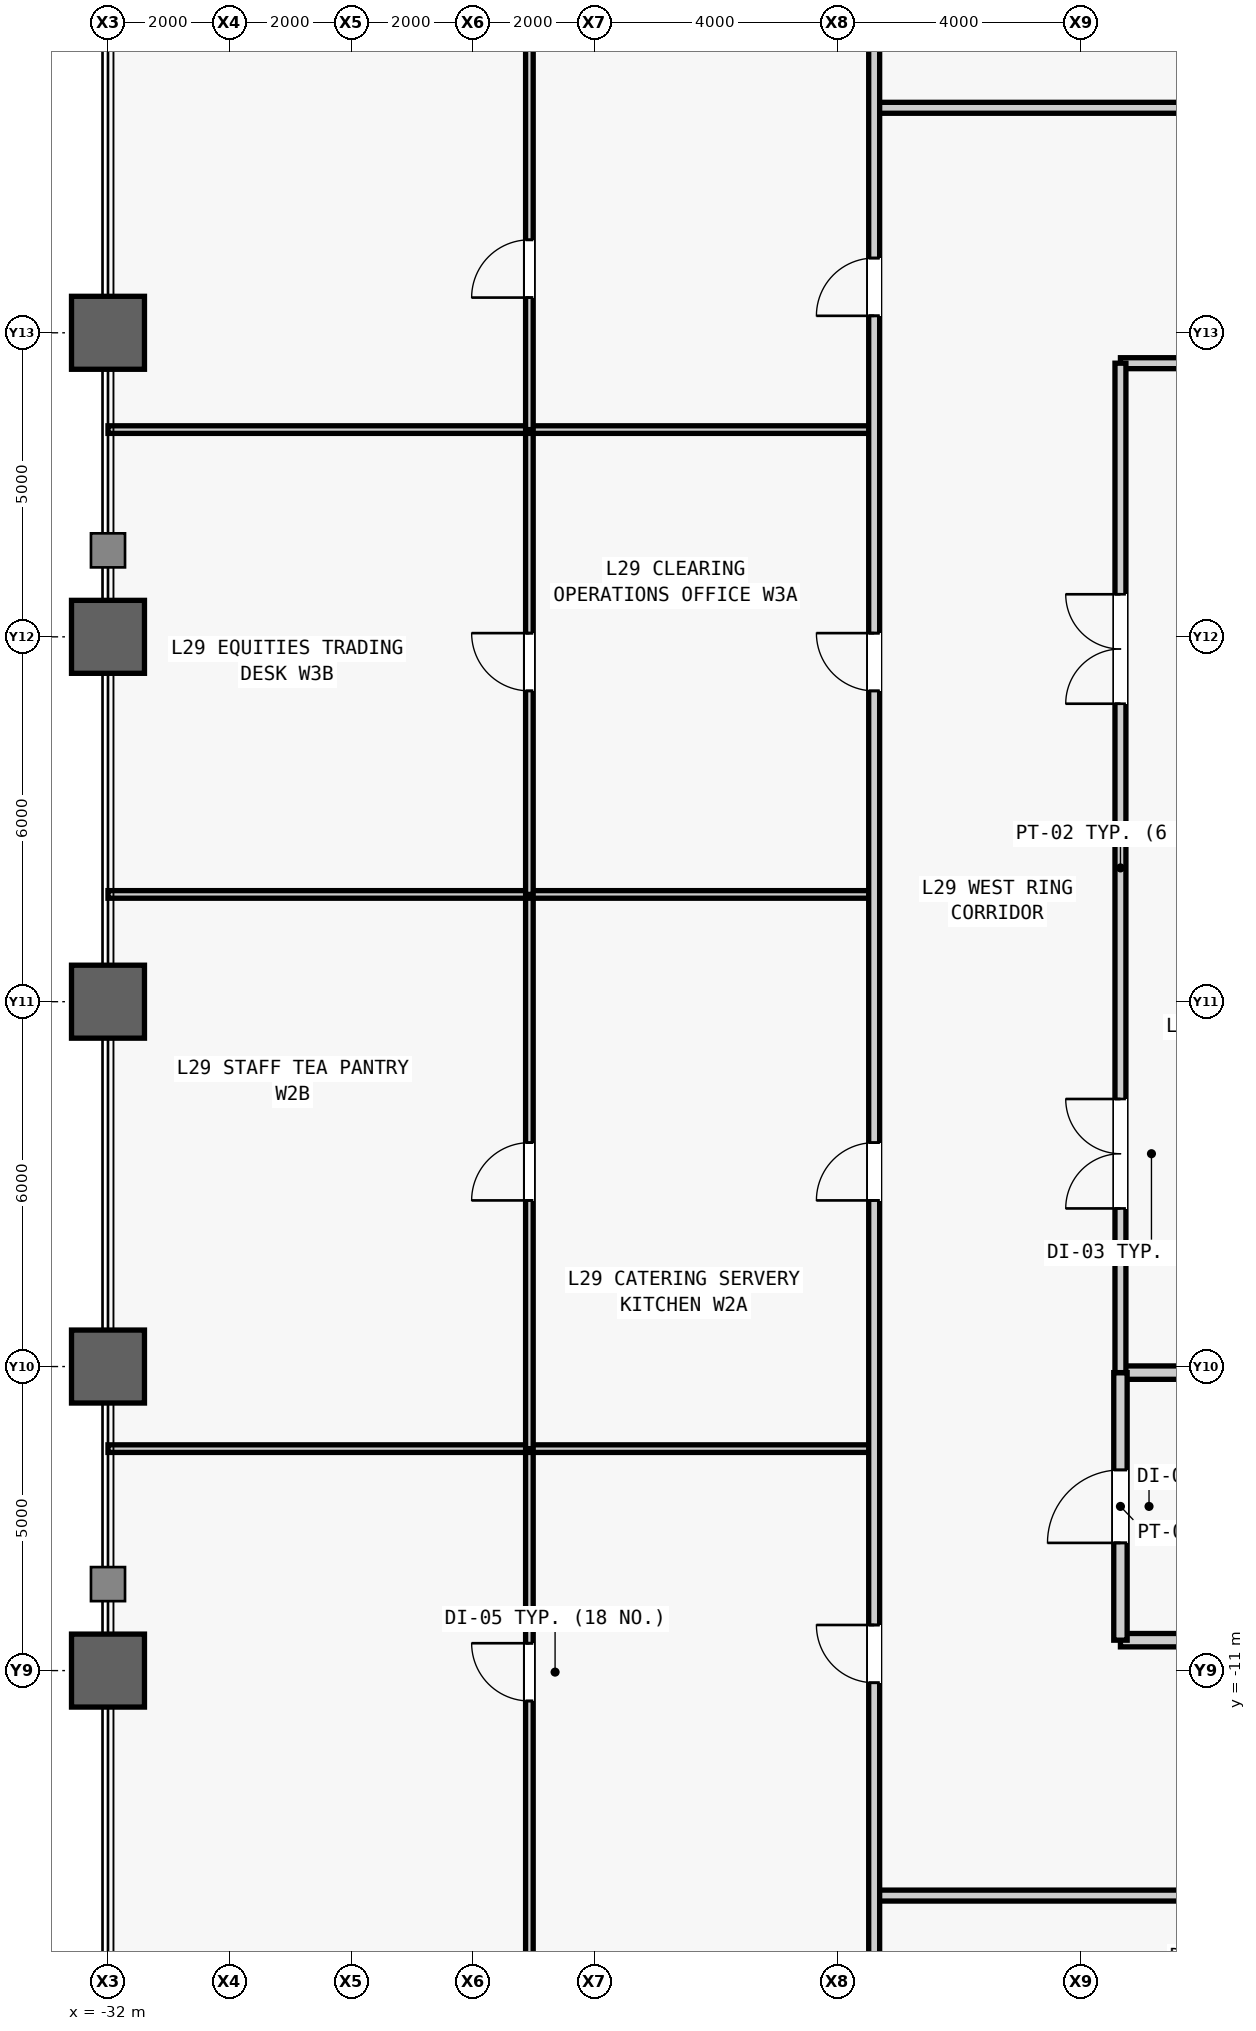
"""IFC4 building model, lengths in metres.
Left out: names, types, materials, properties, quantities, classifications, styles, units other than length and angle.
Written with IfcOpenShell. Run it as: python <this file> out.ifc"""

import sys

from ifc_helpers import new_model, si_unit, direction, frame, frame_2d, origin, origin_2d, place, context, subcontext, project, spatial, rectangle, hollow_rectangle, extrude, source, transform, mapped, element, fill, save


model = new_model("IFC4")
c1 = context("Model", 3, precision=1e-05, world=origin(), true_north=direction((0.0, 1.0)))
c2 = subcontext(c1, "Body", "Model", "MODEL_VIEW")
j1 = project(units=[si_unit("LENGTHUNIT", "METRE"), si_unit("PLANEANGLEUNIT", "RADIAN")], contexts=[c1])
p1 = place(None, origin())
s1 = spatial("IfcSite", under=j1, at=p1, CompositionType="ELEMENT")
p2 = place(p1, origin())
s2 = spatial("IfcBuilding", under=s1, at=p2, CompositionType="ELEMENT")
p3 = place(p2, frame((0.0, 0.0, 128.3)))
s3 = spatial("IfcBuildingStorey", under=s2, at=p3, CompositionType="ELEMENT", Elevation=128.3)
m1 = source(origin(), c2, "Body", "SweptSolid", [
    extrude(hollow_rectangle(XDim=1.2, YDim=1.2, WallThickness=0.07, at=origin_2d()), origin(), (0.0, 0.0, 1.0), 4.1),
])
for number, where, z_axis, x_axis in (
    (1, (-32.0, -11.0, 0.0), (0.0, 0.0, 1.0), (1.0, 0.0, 0.0)),
    (2, (-32.0, -6.0, 0.0), (0.0, 0.0, 1.0), (1.0, 0.0, 0.0)),
    (3, (-32.0, 0.0, 0.0), (0.0, 0.0, 1.0), (1.0, 0.0, 0.0)),
    (4, (-32.0, 6.0, 0.0), (0.0, 0.0, 1.0), (1.0, 0.0, 0.0)),
    (5, (-32.0, 11.0, 0.0), (0.0, 0.0, 1.0), (1.0, 0.0, 0.0)),
):
    element("IfcColumn", number, at=place(p3, frame(where, z_axis=z_axis, x_axis=x_axis)), inside=s3, PredefinedType="COLUMN", context=c2, shape_type="MappedRepresentation", body=[
        mapped(m1, transform((0.0, 0.0, 0.0), scale=1.0)),
    ])
m2 = source(origin(), c2, "Body", "SweptSolid", [
    extrude(rectangle(XDim=4.05, YDim=0.22, at=frame_2d((2.025, 0.0))), origin(), (0.0, 0.0, 1.0), 3.84),
])
p4 = place(p3, frame((-15.35, -10.5, 0.0), z_axis=(0.0, 0.0, 1.0), x_axis=(1.0, 0.0, 0.0)))
e6 = element("IfcWall", 6, at=p4, inside=s3, PredefinedType="PARTITIONING", context=c2, shape_type="MappedRepresentation", body=[
    mapped(m2, transform((0.0, 0.0, 0.0), scale=1.0)),
])
m3 = source(origin(), c2, "Body", "SweptSolid", [
    extrude(rectangle(XDim=4.05, YDim=0.22, at=frame_2d((2.025, 0.0))), origin(), (0.0, 0.0, 1.0), 3.067),
])
p5 = place(p3, frame((-15.35, -6.1, 0.0), z_axis=(0.0, 0.0, 1.0), x_axis=(1.0, 0.0, 0.0)))
e7 = element("IfcWall", 7, at=p5, inside=s3, PredefinedType="PARTITIONING", context=c2, shape_type="MappedRepresentation", body=[
    mapped(m3, transform((0.0, 0.0, 0.0), scale=1.0)),
])
m4 = source(origin(), c2, "Body", "SweptSolid", [
    extrude(rectangle(XDim=4.4, YDim=0.22, at=frame_2d((2.2, 0.0))), origin(), (0.0, 0.0, 1.0), 3.84),
])
p6 = place(p3, frame((-15.35, -10.5, 0.0), z_axis=(0.0, 0.0, 1.0), x_axis=(0.0, 1.0, 0.0)))
e8 = element("IfcWall", 8, at=p6, inside=s3, PredefinedType="PARTITIONING", context=c2, shape_type="MappedRepresentation", body=[
    mapped(m4, transform((0.0, 0.0, 0.0), scale=1.0)),
])
m5 = source(origin(), c2, "Body", "SweptSolid", [
    extrude(rectangle(XDim=1.2, YDim=2.2, at=frame_2d((0.6, 1.1))), frame((0.0, 0.12, 0.0), z_axis=(0.0, -1.0, 0.0), x_axis=(1.0, 0.0, 0.0)), (0.0, 0.0, 1.0), 0.24),
])
p7 = place(p6, frame((1.6, 0.0, 0.0)))
e9 = element("IfcOpeningElement", 9, at=p7, cuts=e8, PredefinedType="OPENING", context=c2, shape_type="MappedRepresentation", body=[
    mapped(m5, transform((0.0, 0.0, 0.0), scale=1.0)),
])
m6 = source(origin(), c2, "Body", "SweptSolid", [
    extrude(rectangle(XDim=4.05, YDim=0.18, at=frame_2d((2.025, 0.0))), origin(), (0.0, 0.0, 1.0), 3.84),
])
p8 = place(p3, frame((-15.35, 10.5, 0.0), z_axis=(0.0, 0.0, 1.0), x_axis=(1.0, 0.0, 0.0)))
e10 = element("IfcWall", 10, at=p8, inside=s3, PredefinedType="PARTITIONING", context=c2, shape_type="MappedRepresentation", body=[
    mapped(m6, transform((0.0, 0.0, 0.0), scale=1.0)),
])
m7 = source(origin(), c2, "Body", "SweptSolid", [
    extrude(rectangle(XDim=16.6, YDim=0.18, at=frame_2d((8.3, 0.0))), origin(), (0.0, 0.0, 1.0), 3.84),
])
p9 = place(p3, frame((-15.35, -6.1, 0.0), z_axis=(0.0, 0.0, 1.0), x_axis=(0.0, 1.0, 0.0)))
e11 = element("IfcWall", 11, at=p9, inside=s3, PredefinedType="PARTITIONING", context=c2, shape_type="MappedRepresentation", body=[
    mapped(m7, transform((0.0, 0.0, 0.0), scale=1.0)),
])
m8 = source(origin(), c2, "Body", "SweptSolid", [
    extrude(rectangle(XDim=1.8, YDim=2.25, at=frame_2d((0.9, 1.125))), frame((0.0, 0.1, 0.0), z_axis=(0.0, -1.0, 0.0), x_axis=(1.0, 0.0, 0.0)), (0.0, 0.0, 1.0), 0.2),
])
p10 = place(p9, frame((2.7, 0.0, 0.0)))
e12 = element("IfcOpeningElement", 12, at=p10, cuts=e11, PredefinedType="OPENING", context=c2, shape_type="MappedRepresentation", body=[
    mapped(m8, transform((0.0, 0.0, 0.0), scale=1.0)),
])
p11 = place(p9, frame((11.0, 0.0, 0.0)))
e13 = element("IfcOpeningElement", 13, at=p11, cuts=e11, PredefinedType="OPENING", context=c2, shape_type="MappedRepresentation", body=[
    mapped(m8, transform((0.0, 0.0, 0.0), scale=1.0)),
])
m9 = source(origin(), c2, "Body", "SweptSolid", [
    extrude(rectangle(XDim=37.1, YDim=0.18, at=frame_2d((18.55, 0.0))), origin(), (0.0, 0.0, 1.0), 3.84),
])
p12 = place(p3, frame((-19.4, -14.7, 0.0), z_axis=(0.0, 0.0, 1.0), x_axis=(1.0, 0.0, 0.0)))
e14 = element("IfcWall", 14, at=p12, inside=s3, PredefinedType="PARTITIONING", context=c2, shape_type="MappedRepresentation", body=[
    mapped(m9, transform((0.0, 0.0, 0.0), scale=1.0)),
])
m10 = source(origin(), c2, "Body", "SweptSolid", [
    extrude(rectangle(XDim=1.05, YDim=2.2, at=frame_2d((0.525, 1.1))), frame((0.0, 0.1, 0.0), z_axis=(0.0, -1.0, 0.0), x_axis=(1.0, 0.0, 0.0)), (0.0, 0.0, 1.0), 0.2),
])
p13 = place(p12, frame((6.056, 0.0, 0.0)))
e15 = element("IfcOpeningElement", 15, at=p13, cuts=e14, PredefinedType="OPENING", context=c2, shape_type="MappedRepresentation", body=[
    mapped(m10, transform((0.0, 0.0, 0.0), scale=1.0)),
])
p14 = place(p12, frame((12.46, 0.0, 0.0)))
e16 = element("IfcOpeningElement", 16, at=p14, cuts=e14, PredefinedType="OPENING", context=c2, shape_type="MappedRepresentation", body=[
    mapped(m10, transform((0.0, 0.0, 0.0), scale=1.0)),
])
p15 = place(p12, frame((22.477, 0.0, 0.0)))
e17 = element("IfcOpeningElement", 17, at=p15, cuts=e14, PredefinedType="OPENING", context=c2, shape_type="MappedRepresentation", body=[
    mapped(m10, transform((0.0, 0.0, 0.0), scale=1.0)),
])
p16 = place(p12, frame((30.473, 0.0, 0.0)))
e18 = element("IfcOpeningElement", 18, at=p16, cuts=e14, PredefinedType="OPENING", context=c2, shape_type="MappedRepresentation", body=[
    mapped(m10, transform((0.0, 0.0, 0.0), scale=1.0)),
])
p17 = place(p3, frame((-19.4, 14.7, 0.0), z_axis=(0.0, 0.0, 1.0), x_axis=(1.0, 0.0, 0.0)))
e19 = element("IfcWall", 19, at=p17, inside=s3, PredefinedType="PARTITIONING", context=c2, shape_type="MappedRepresentation", body=[
    mapped(m9, transform((0.0, 0.0, 0.0), scale=1.0)),
])
p18 = place(p17, frame((10.323, 0.0, 0.0)))
e20 = element("IfcOpeningElement", 20, at=p18, cuts=e19, PredefinedType="OPENING", context=c2, shape_type="MappedRepresentation", body=[
    mapped(m10, transform((0.0, 0.0, 0.0), scale=1.0)),
])
p19 = place(p17, frame((24.722, 0.0, 0.0)))
e21 = element("IfcOpeningElement", 21, at=p19, cuts=e19, PredefinedType="OPENING", context=c2, shape_type="MappedRepresentation", body=[
    mapped(m10, transform((0.0, 0.0, 0.0), scale=1.0)),
])
m11 = source(origin(), c2, "Body", "SweptSolid", [
    extrude(rectangle(XDim=20.65, YDim=0.125, at=frame_2d((10.325, 0.0))), origin(), (0.0, 0.0, 1.0), 3.84),
])
p20 = place(p3, frame((-25.07, -28.0, 0.0), z_axis=(0.0, 0.0, 1.0), x_axis=(0.0, 1.0, 0.0)))
e22 = element("IfcWall", 22, at=p20, inside=s3, PredefinedType="PARTITIONING", context=c2, shape_type="MappedRepresentation", body=[
    mapped(m11, transform((0.0, 0.0, 0.0), scale=1.0)),
])
m12 = source(origin(), c2, "Body", "SweptSolid", [
    extrude(rectangle(XDim=0.95, YDim=2.15, at=frame_2d((0.475, 1.075))), frame((0.0, 0.073, 0.0), z_axis=(0.0, -1.0, 0.0), x_axis=(1.0, 0.0, 0.0)), (0.0, 0.0, 1.0), 0.145),
])
p21 = place(p20, frame((16.5, 0.0, 0.0)))
e23 = element("IfcOpeningElement", 23, at=p21, cuts=e22, PredefinedType="OPENING", context=c2, shape_type="MappedRepresentation", body=[
    mapped(m12, transform((0.0, 0.0, 0.0), scale=1.0)),
])
m13 = source(origin(), c2, "Body", "SweptSolid", [
    extrude(rectangle(XDim=12.6, YDim=0.125, at=frame_2d((6.3, 0.0))), origin(), (0.0, 0.0, 1.0), 3.84),
])
p22 = place(p3, frame((-32.0, -7.35, 0.0), z_axis=(0.0, 0.0, 1.0), x_axis=(1.0, 0.0, 0.0)))
e24 = element("IfcWall", 24, at=p22, inside=s3, PredefinedType="PARTITIONING", context=c2, shape_type="MappedRepresentation", body=[
    mapped(m13, transform((0.0, 0.0, 0.0), scale=1.0)),
])
m14 = source(origin(), c2, "Body", "SweptSolid", [
    extrude(rectangle(XDim=9.114, YDim=0.125, at=frame_2d((4.557, 0.0))), origin(), (0.0, 0.0, 1.0), 3.84),
])
p23 = place(p3, frame((-25.07, -7.35, 0.0), z_axis=(0.0, 0.0, 1.0), x_axis=(0.0, 1.0, 0.0)))
e25 = element("IfcWall", 25, at=p23, inside=s3, PredefinedType="PARTITIONING", context=c2, shape_type="MappedRepresentation", body=[
    mapped(m14, transform((0.0, 0.0, 0.0), scale=1.0)),
])
p24 = place(p23, frame((4.082, 0.0, 0.0)))
e26 = element("IfcOpeningElement", 26, at=p24, cuts=e25, PredefinedType="OPENING", context=c2, shape_type="MappedRepresentation", body=[
    mapped(m12, transform((0.0, 0.0, 0.0), scale=1.0)),
])
p25 = place(p3, frame((-32.0, 1.764, 0.0), z_axis=(0.0, 0.0, 1.0), x_axis=(1.0, 0.0, 0.0)))
e27 = element("IfcWall", 27, at=p25, inside=s3, PredefinedType="PARTITIONING", context=c2, shape_type="MappedRepresentation", body=[
    mapped(m13, transform((0.0, 0.0, 0.0), scale=1.0)),
])
m15 = source(origin(), c2, "Body", "SweptSolid", [
    extrude(rectangle(XDim=7.644, YDim=0.125, at=frame_2d((3.822, 0.0))), origin(), (0.0, 0.0, 1.0), 3.84),
])
p26 = place(p3, frame((-25.07, 1.764, 0.0), z_axis=(0.0, 0.0, 1.0), x_axis=(0.0, 1.0, 0.0)))
e28 = element("IfcWall", 28, at=p26, inside=s3, PredefinedType="PARTITIONING", context=c2, shape_type="MappedRepresentation", body=[
    mapped(m15, transform((0.0, 0.0, 0.0), scale=1.0)),
])
p27 = place(p26, frame((3.347, 0.0, 0.0)))
e29 = element("IfcOpeningElement", 29, at=p27, cuts=e28, PredefinedType="OPENING", context=c2, shape_type="MappedRepresentation", body=[
    mapped(m12, transform((0.0, 0.0, 0.0), scale=1.0)),
])
p28 = place(p3, frame((-32.0, 9.408, 0.0), z_axis=(0.0, 0.0, 1.0), x_axis=(1.0, 0.0, 0.0)))
e30 = element("IfcWall", 30, at=p28, inside=s3, PredefinedType="PARTITIONING", context=c2, shape_type="MappedRepresentation", body=[
    mapped(m13, transform((0.0, 0.0, 0.0), scale=1.0)),
])
m16 = source(origin(), c2, "Body", "SweptSolid", [
    extrude(rectangle(XDim=18.592, YDim=0.125, at=frame_2d((9.296, 0.0))), origin(), (0.0, 0.0, 1.0), 3.84),
])
p29 = place(p3, frame((-25.07, 9.408, 0.0), z_axis=(0.0, 0.0, 1.0), x_axis=(0.0, 1.0, 0.0)))
e31 = element("IfcWall", 31, at=p29, inside=s3, PredefinedType="PARTITIONING", context=c2, shape_type="MappedRepresentation", body=[
    mapped(m16, transform((0.0, 0.0, 0.0), scale=1.0)),
])
p30 = place(p29, frame((2.171, 0.0, 0.0)))
e32 = element("IfcOpeningElement", 32, at=p30, cuts=e31, PredefinedType="OPENING", context=c2, shape_type="MappedRepresentation", body=[
    mapped(m12, transform((0.0, 0.0, 0.0), scale=1.0)),
])
m17 = source(origin(), c2, "Body", "SweptSolid", [
    extrude(rectangle(XDim=56.0, YDim=0.18, at=frame_2d((28.0, 0.0))), origin(), (0.0, 0.0, 1.0), 3.371),
])
p31 = place(p3, frame((-19.4, -28.0, 0.0), z_axis=(0.0, 0.0, 1.0), x_axis=(0.0, 1.0, 0.0)))
e33 = element("IfcWall", 33, at=p31, inside=s3, PredefinedType="PARTITIONING", context=c2, shape_type="MappedRepresentation", body=[
    mapped(m17, transform((0.0, 0.0, 0.0), scale=1.0)),
])
m18 = source(origin(), c2, "Body", "SweptSolid", [
    extrude(rectangle(XDim=0.95, YDim=2.15, at=frame_2d((0.475, 1.075))), frame((0.0, 0.1, 0.0), z_axis=(0.0, -1.0, 0.0), x_axis=(1.0, 0.0, 0.0)), (0.0, 0.0, 1.0), 0.2),
])
p32 = place(p31, frame((16.8, 0.0, 0.0)))
e34 = element("IfcOpeningElement", 34, at=p32, cuts=e33, PredefinedType="OPENING", context=c2, shape_type="MappedRepresentation", body=[
    mapped(m18, transform((0.0, 0.0, 0.0), scale=1.0)),
])
p33 = place(p31, frame((24.732, 0.0, 0.0)))
e35 = element("IfcOpeningElement", 35, at=p33, cuts=e33, PredefinedType="OPENING", context=c2, shape_type="MappedRepresentation", body=[
    mapped(m18, transform((0.0, 0.0, 0.0), scale=1.0)),
])
p34 = place(p31, frame((33.111, 0.0, 0.0)))
e36 = element("IfcOpeningElement", 36, at=p34, cuts=e33, PredefinedType="OPENING", context=c2, shape_type="MappedRepresentation", body=[
    mapped(m18, transform((0.0, 0.0, 0.0), scale=1.0)),
])
p35 = place(p31, frame((39.279, 0.0, 0.0)))
e37 = element("IfcOpeningElement", 37, at=p35, cuts=e33, PredefinedType="OPENING", context=c2, shape_type="MappedRepresentation", body=[
    mapped(m18, transform((0.0, 0.0, 0.0), scale=1.0)),
])
m19 = source(origin(), c2, "Body", "SweptSolid", [
    extrude(rectangle(XDim=1.2, YDim=2.2, at=frame_2d((0.6, 1.1))), frame((0.0, 0.025, 0.0), z_axis=(0.0, -1.0, 0.0), x_axis=(1.0, 0.0, 0.0)), (0.0, 0.0, 1.0), 0.05),
])
p36 = place(p7, origin())
e38 = element("IfcDoor", 38, at=p36, inside=s3, OperationType="SINGLE_SWING_LEFT", PredefinedType="DOOR", context=c2, shape_type="MappedRepresentation", body=[
    mapped(m19, transform((0.0, 0.0, 0.0), scale=1.0)),
])
fill(e9, e38)
m20 = source(origin(), c2, "Body", "SweptSolid", [
    extrude(rectangle(XDim=1.8, YDim=2.25, at=frame_2d((0.9, 1.125))), frame((0.0, 0.025, 0.0), z_axis=(0.0, -1.0, 0.0), x_axis=(1.0, 0.0, 0.0)), (0.0, 0.0, 1.0), 0.05),
])
p37 = place(p10, origin())
e39 = element("IfcDoor", 39, at=p37, inside=s3, OperationType="SINGLE_SWING_LEFT", PredefinedType="DOOR", context=c2, shape_type="MappedRepresentation", body=[
    mapped(m20, transform((0.0, 0.0, 0.0), scale=1.0)),
])
fill(e12, e39)
p38 = place(p11, origin())
e40 = element("IfcDoor", 40, at=p38, inside=s3, OperationType="SINGLE_SWING_RIGHT", PredefinedType="DOOR", context=c2, shape_type="MappedRepresentation", body=[
    mapped(m20, transform((0.0, 0.0, 0.0), scale=1.0)),
])
fill(e13, e40)
m21 = source(origin(), c2, "Body", "SweptSolid", [
    extrude(rectangle(XDim=0.95, YDim=2.15, at=frame_2d((0.475, 1.075))), frame((0.0, 0.025, 0.0), z_axis=(0.0, -1.0, 0.0), x_axis=(1.0, 0.0, 0.0)), (0.0, 0.0, 1.0), 0.05),
])
p39 = place(p21, origin())
e41 = element("IfcDoor", 41, at=p39, inside=s3, OperationType="SINGLE_SWING_RIGHT", PredefinedType="DOOR", context=c2, shape_type="MappedRepresentation", body=[
    mapped(m21, transform((0.0, 0.0, 0.0), scale=1.0)),
])
fill(e23, e41)
p40 = place(p24, origin())
e42 = element("IfcDoor", 42, at=p40, inside=s3, OperationType="SINGLE_SWING_LEFT", PredefinedType="DOOR", context=c2, shape_type="MappedRepresentation", body=[
    mapped(m21, transform((0.0, 0.0, 0.0), scale=1.0)),
])
fill(e26, e42)
p41 = place(p27, origin())
e43 = element("IfcDoor", 43, at=p41, inside=s3, OperationType="SINGLE_SWING_RIGHT", PredefinedType="DOOR", context=c2, shape_type="MappedRepresentation", body=[
    mapped(m21, transform((0.0, 0.0, 0.0), scale=1.0)),
])
fill(e29, e43)
p42 = place(p30, origin())
e44 = element("IfcDoor", 44, at=p42, inside=s3, OperationType="SINGLE_SWING_LEFT", PredefinedType="DOOR", context=c2, shape_type="MappedRepresentation", body=[
    mapped(m21, transform((0.0, 0.0, 0.0), scale=1.0)),
])
fill(e32, e44)
p43 = place(p32, origin())
e45 = element("IfcDoor", 45, at=p43, inside=s3, OperationType="SINGLE_SWING_RIGHT", PredefinedType="DOOR", context=c2, shape_type="MappedRepresentation", body=[
    mapped(m21, transform((0.0, 0.0, 0.0), scale=1.0)),
])
fill(e34, e45)
p44 = place(p33, origin())
e46 = element("IfcDoor", 46, at=p44, inside=s3, OperationType="SINGLE_SWING_LEFT", PredefinedType="DOOR", context=c2, shape_type="MappedRepresentation", body=[
    mapped(m21, transform((0.0, 0.0, 0.0), scale=1.0)),
])
fill(e35, e46)
p45 = place(p34, origin())
e47 = element("IfcDoor", 47, at=p45, inside=s3, OperationType="SINGLE_SWING_RIGHT", PredefinedType="DOOR", context=c2, shape_type="MappedRepresentation", body=[
    mapped(m21, transform((0.0, 0.0, 0.0), scale=1.0)),
])
fill(e36, e47)
p46 = place(p35, origin())
e48 = element("IfcDoor", 48, at=p46, inside=s3, OperationType="SINGLE_SWING_LEFT", PredefinedType="DOOR", context=c2, shape_type="MappedRepresentation", body=[
    mapped(m21, transform((0.0, 0.0, 0.0), scale=1.0)),
])
fill(e37, e48)
save(model, sys.argv[1])
